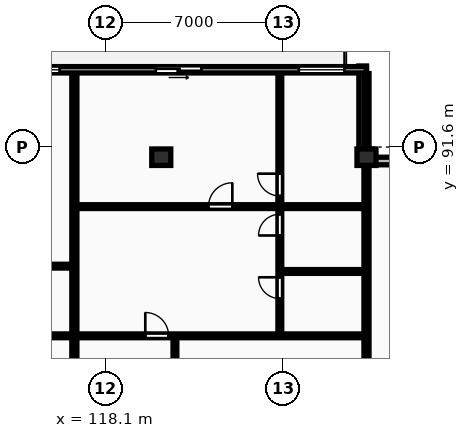
"""IFC4 building model, lengths in metres.
Left out: names, types, materials, properties, quantities, classifications, styles, units other than length and angle.
Written with IfcOpenShell. Run it as: python <this file> out.ifc"""

import sys

from ifc_helpers import new_model, si_unit, direction, frame, frame_2d, origin, origin_2d, place, context, subcontext, project, spatial, rectangle, extrude, element, fill, save


model = new_model("IFC4")
c1 = context("Model", 3, precision=1e-05, world=origin(), true_north=direction((0.0, 1.0)))
c2 = subcontext(c1, "Body", "Model", "MODEL_VIEW")
j1 = project(units=[si_unit("LENGTHUNIT", "METRE"), si_unit("PLANEANGLEUNIT", "RADIAN")], contexts=[c1])
p1 = place(None, origin())
s1 = spatial("IfcSite", under=j1, at=p1, CompositionType="ELEMENT")
p2 = place(p1, origin())
s2 = spatial("IfcBuilding", under=s1, at=p2, CompositionType="ELEMENT")
p3 = place(p2, frame((0.0, 0.0, 228.65)))
s3 = spatial("IfcBuildingStorey", under=s2, at=p3, CompositionType="ELEMENT", Elevation=228.65)
for number, where, z_axis, x_axis in (
    (1, (120.3, 91.2, 0.0), (0.0, 0.0, 1.0), (1.0, 0.0, 0.0)),
    (2, (128.4, 91.2, 0.0), (0.0, 0.0, 1.0), (1.0, 0.0, 0.0)),
):
    element("IfcColumn", number, at=place(p3, frame(where, z_axis=z_axis, x_axis=x_axis)), inside=s3, PredefinedType="COLUMN", context=c2, shape_type="SweptSolid", body=[
        extrude(rectangle(XDim=0.75, YDim=0.65, at=origin_2d()), origin(), (0.0, 0.0, 1.0), 3.45),
    ])
for number, where, z_axis, x_axis in (
    (3, (132.0, 91.05, 0.0), (0.0, 0.0, 1.0), (-1.0, 0.0, 0.0)),
    (4, (128.25, 91.2, 0.0), (0.0, 0.0, 1.0), (0.0, 1.0, 0.0)),
):
    element("IfcWall", number, at=place(p3, frame(where, z_axis=z_axis, x_axis=x_axis)), inside=s3, PredefinedType="STANDARD", context=c2, shape_type="SweptSolid", body=[
        extrude(rectangle(XDim=3.6, YDim=0.3, at=frame_2d((1.8, 0.0))), origin(), (0.0, 0.0, 1.0), 3.17),
    ])
p4 = place(p3, frame((128.4, 94.65, 0.0), z_axis=(0.0, 0.0, 1.0), x_axis=(-1.0, 0.0, 0.0)))
e5 = element("IfcWall", 5, at=p4, inside=s3, PredefinedType="STANDARD", context=c2, shape_type="SweptSolid", body=[
    extrude(rectangle(XDim=68.6, YDim=0.25, at=frame_2d((34.3, 0.0))), origin(), (0.0, 0.0, 1.0), 3.17),
])
p5 = place(p4, frame((59.262, 0.0, 0.85)))
e6 = element("IfcOpeningElement", 6, at=p5, cuts=e5, PredefinedType="OPENING", context=c2, shape_type="SweptSolid", body=[
    extrude(rectangle(XDim=2.4, YDim=1.9, at=frame_2d((1.2, 0.95))), frame((0.0, 0.135, 0.0), z_axis=(0.0, -1.0, 0.0), x_axis=(1.0, 0.0, 0.0)), (0.0, 0.0, 1.0), 0.27),
])
p6 = place(p4, frame((52.567, 0.0, 0.85)))
e7 = element("IfcOpeningElement", 7, at=p6, cuts=e5, PredefinedType="OPENING", context=c2, shape_type="SweptSolid", body=[
    extrude(rectangle(XDim=2.4, YDim=1.9, at=frame_2d((1.2, 0.95))), frame((0.0, 0.135, 0.0), z_axis=(0.0, -1.0, 0.0), x_axis=(1.0, 0.0, 0.0)), (0.0, 0.0, 1.0), 0.27),
])
p7 = place(p4, frame((65.245, 0.0, 0.0)))
e8 = element("IfcOpeningElement", 8, at=p7, cuts=e5, PredefinedType="OPENING", context=c2, shape_type="SweptSolid", body=[
    extrude(rectangle(XDim=1.8, YDim=2.2, at=frame_2d((0.9, 1.1))), frame((0.0, 0.135, 0.0), z_axis=(0.0, -1.0, 0.0), x_axis=(1.0, 0.0, 0.0)), (0.0, 0.0, 1.0), 0.27),
])
p8 = place(p4, frame((47.726, 0.0, 0.85)))
e9 = element("IfcOpeningElement", 9, at=p8, cuts=e5, PredefinedType="OPENING", context=c2, shape_type="SweptSolid", body=[
    extrude(rectangle(XDim=1.8, YDim=1.8, at=frame_2d((0.9, 0.9))), frame((0.0, 0.135, 0.0), z_axis=(0.0, -1.0, 0.0), x_axis=(1.0, 0.0, 0.0)), (0.0, 0.0, 1.0), 0.27),
])
p9 = place(p4, frame((41.938, 0.0, 0.0)))
e10 = element("IfcOpeningElement", 10, at=p9, cuts=e5, PredefinedType="OPENING", context=c2, shape_type="SweptSolid", body=[
    extrude(rectangle(XDim=1.8, YDim=2.2, at=frame_2d((0.9, 1.1))), frame((0.0, 0.135, 0.0), z_axis=(0.0, -1.0, 0.0), x_axis=(1.0, 0.0, 0.0)), (0.0, 0.0, 1.0), 0.27),
])
p10 = place(p4, frame((32.824, 0.0, 0.85)))
e11 = element("IfcOpeningElement", 11, at=p10, cuts=e5, PredefinedType="OPENING", context=c2, shape_type="SweptSolid", body=[
    extrude(rectangle(XDim=2.4, YDim=1.9, at=frame_2d((1.2, 0.95))), frame((0.0, 0.135, 0.0), z_axis=(0.0, -1.0, 0.0), x_axis=(1.0, 0.0, 0.0)), (0.0, 0.0, 1.0), 0.27),
])
p11 = place(p4, frame((20.245, 0.0, 0.85)))
e12 = element("IfcOpeningElement", 12, at=p11, cuts=e5, PredefinedType="OPENING", context=c2, shape_type="SweptSolid", body=[
    extrude(rectangle(XDim=2.4, YDim=1.9, at=frame_2d((1.2, 0.95))), frame((0.0, 0.135, 0.0), z_axis=(0.0, -1.0, 0.0), x_axis=(1.0, 0.0, 0.0)), (0.0, 0.0, 1.0), 0.27),
])
p12 = place(p4, frame((15.645, 0.0, 0.85)))
e13 = element("IfcOpeningElement", 13, at=p12, cuts=e5, PredefinedType="OPENING", context=c2, shape_type="SweptSolid", body=[
    extrude(rectangle(XDim=2.4, YDim=1.9, at=frame_2d((1.2, 0.95))), frame((0.0, 0.135, 0.0), z_axis=(0.0, -1.0, 0.0), x_axis=(1.0, 0.0, 0.0)), (0.0, 0.0, 1.0), 0.27),
])
p13 = place(p4, frame((25.272, 0.0, 0.0)))
e14 = element("IfcOpeningElement", 14, at=p13, cuts=e5, PredefinedType="OPENING", context=c2, shape_type="SweptSolid", body=[
    extrude(rectangle(XDim=1.8, YDim=2.2, at=frame_2d((0.9, 1.1))), frame((0.0, 0.135, 0.0), z_axis=(0.0, -1.0, 0.0), x_axis=(1.0, 0.0, 0.0)), (0.0, 0.0, 1.0), 0.27),
])
p14 = place(p4, frame((12.11, 0.0, 0.85)))
e15 = element("IfcOpeningElement", 15, at=p14, cuts=e5, PredefinedType="OPENING", context=c2, shape_type="SweptSolid", body=[
    extrude(rectangle(XDim=1.8, YDim=1.8, at=frame_2d((0.9, 0.9))), frame((0.0, 0.135, 0.0), z_axis=(0.0, -1.0, 0.0), x_axis=(1.0, 0.0, 0.0)), (0.0, 0.0, 1.0), 0.27),
])
p15 = place(p4, frame((6.515, 0.0, 0.0)))
e16 = element("IfcOpeningElement", 16, at=p15, cuts=e5, PredefinedType="OPENING", context=c2, shape_type="SweptSolid", body=[
    extrude(rectangle(XDim=1.8, YDim=2.2, at=frame_2d((0.9, 1.1))), frame((0.0, 0.135, 0.0), z_axis=(0.0, -1.0, 0.0), x_axis=(1.0, 0.0, 0.0)), (0.0, 0.0, 1.0), 0.27),
])
p16 = place(p4, frame((0.87, 0.0, 0.85)))
e17 = element("IfcOpeningElement", 17, at=p16, cuts=e5, PredefinedType="OPENING", context=c2, shape_type="SweptSolid", body=[
    extrude(rectangle(XDim=1.8, YDim=1.8, at=frame_2d((0.9, 0.9))), frame((0.0, 0.135, 0.0), z_axis=(0.0, -1.0, 0.0), x_axis=(1.0, 0.0, 0.0)), (0.0, 0.0, 1.0), 0.27),
])
p17 = place(p3, frame((128.4, 70.18, 0.0), z_axis=(0.0, 0.0, 1.0), x_axis=(0.0, 1.0, 0.0)))
e18 = element("IfcWall", 18, at=p17, inside=s3, PredefinedType="PARTITIONING", context=c2, shape_type="SweptSolid", body=[
    extrude(rectangle(XDim=24.32, YDim=0.2, at=frame_2d((12.16, 0.0))), origin(), (0.0, 0.0, 1.0), 2.477),
])
p18 = place(p3, frame((116.87, 70.18, 0.0), z_axis=(0.0, 0.0, 1.0), x_axis=(0.0, 1.0, 0.0)))
e19 = element("IfcWall", 19, at=p18, inside=s3, PredefinedType="PARTITIONING", context=c2, shape_type="SweptSolid", body=[
    extrude(rectangle(XDim=24.32, YDim=0.2, at=frame_2d((12.16, 0.0))), origin(), (0.0, 0.0, 1.0), 3.17),
])
p19 = place(p3, frame((104.82, 86.9, 0.0), z_axis=(0.0, 0.0, 1.0), x_axis=(1.0, 0.0, 0.0)))
e20 = element("IfcWall", 20, at=p19, inside=s3, PredefinedType="PARTITIONING", context=c2, shape_type="SweptSolid", body=[
    extrude(rectangle(XDim=11.969, YDim=0.15, at=frame_2d((5.985, 0.0))), origin(), (0.0, 0.0, 1.0), 3.17),
])
p20 = place(p19, frame((1.21, 0.0, 0.0)))
e21 = element("IfcOpeningElement", 21, at=p20, cuts=e20, PredefinedType="OPENING", context=c2, shape_type="SweptSolid", body=[
    extrude(rectangle(XDim=0.84, YDim=2.04, at=frame_2d((0.42, 1.02))), frame((0.0, 0.085, 0.0), z_axis=(0.0, -1.0, 0.0), x_axis=(1.0, 0.0, 0.0)), (0.0, 0.0, 1.0), 0.17),
])
p21 = place(p19, frame((5.565, 0.0, 0.0)))
e22 = element("IfcOpeningElement", 22, at=p21, cuts=e20, PredefinedType="OPENING", context=c2, shape_type="SweptSolid", body=[
    extrude(rectangle(XDim=0.84, YDim=2.04, at=frame_2d((0.42, 1.02))), frame((0.0, 0.085, 0.0), z_axis=(0.0, -1.0, 0.0), x_axis=(1.0, 0.0, 0.0)), (0.0, 0.0, 1.0), 0.17),
])
p22 = place(p19, frame((9.41, 0.0, 0.0)))
e23 = element("IfcOpeningElement", 23, at=p22, cuts=e20, PredefinedType="OPENING", context=c2, shape_type="SweptSolid", body=[
    extrude(rectangle(XDim=0.84, YDim=2.04, at=frame_2d((0.42, 1.02))), frame((0.0, 0.085, 0.0), z_axis=(0.0, -1.0, 0.0), x_axis=(1.0, 0.0, 0.0)), (0.0, 0.0, 1.0), 0.17),
])
p23 = place(p3, frame((99.635, 84.15, 0.0), z_axis=(0.0, 0.0, 1.0), x_axis=(1.0, 0.0, 0.0)))
e24 = element("IfcWall", 24, at=p23, inside=s3, PredefinedType="PARTITIONING", context=c2, shape_type="SweptSolid", body=[
    extrude(rectangle(XDim=17.154, YDim=0.15, at=frame_2d((8.577, 0.0))), origin(), (0.0, 0.0, 1.0), 3.17),
])
p24 = place(p23, frame((2.72, 0.0, 0.0)))
e25 = element("IfcOpeningElement", 25, at=p24, cuts=e24, PredefinedType="OPENING", context=c2, shape_type="SweptSolid", body=[
    extrude(rectangle(XDim=0.92, YDim=2.08, at=frame_2d((0.46, 1.04))), frame((0.0, 0.085, 0.0), z_axis=(0.0, -1.0, 0.0), x_axis=(1.0, 0.0, 0.0)), (0.0, 0.0, 1.0), 0.17),
])
p25 = place(p3, frame((120.84, 70.16, 0.0), z_axis=(0.0, 0.0, 1.0), x_axis=(0.0, 1.0, 0.0)))
e26 = element("IfcWall", 26, at=p25, inside=s3, PredefinedType="PARTITIONING", context=c2, shape_type="SweptSolid", body=[
    extrude(rectangle(XDim=13.95, YDim=0.15, at=frame_2d((6.975, 0.0))), origin(), (0.0, 0.0, 1.0), 3.17),
])
p26 = place(p25, frame((5.845, 0.0, 0.0)))
e27 = element("IfcOpeningElement", 27, at=p26, cuts=e26, PredefinedType="OPENING", context=c2, shape_type="SweptSolid", body=[
    extrude(rectangle(XDim=0.88, YDim=2.06, at=frame_2d((0.44, 1.03))), frame((0.0, 0.085, 0.0), z_axis=(0.0, -1.0, 0.0), x_axis=(1.0, 0.0, 0.0)), (0.0, 0.0, 1.0), 0.17),
])
p27 = place(p3, frame((125.04, 86.69, 0.0), z_axis=(0.0, 0.0, 1.0), x_axis=(1.0, 0.0, 0.0)))
e28 = element("IfcWall", 28, at=p27, inside=s3, PredefinedType="PARTITIONING", context=c2, shape_type="SweptSolid", body=[
    extrude(rectangle(XDim=3.28, YDim=0.15, at=frame_2d((1.64, 0.0))), origin(), (0.0, 0.0, 1.0), 3.17),
])
p28 = place(p3, frame((124.98, 84.19, 0.0), z_axis=(0.0, 0.0, 1.0), x_axis=(0.0, 1.0, 0.0)))
e29 = element("IfcWall", 29, at=p28, inside=s3, PredefinedType="PARTITIONING", context=c2, shape_type="SweptSolid", body=[
    extrude(rectangle(XDim=10.31, YDim=0.15, at=frame_2d((5.155, 0.0))), origin(), (0.0, 0.0, 1.0), 3.17),
])
p29 = place(p28, frame((1.43, 0.0, 0.0)))
e30 = element("IfcOpeningElement", 30, at=p29, cuts=e29, PredefinedType="OPENING", context=c2, shape_type="SweptSolid", body=[
    extrude(rectangle(XDim=0.84, YDim=2.04, at=frame_2d((0.42, 1.02))), frame((0.0, 0.085, 0.0), z_axis=(0.0, -1.0, 0.0), x_axis=(1.0, 0.0, 0.0)), (0.0, 0.0, 1.0), 0.17),
])
p30 = place(p28, frame((3.92, 0.0, 0.0)))
e31 = element("IfcOpeningElement", 31, at=p30, cuts=e29, PredefinedType="OPENING", context=c2, shape_type="SweptSolid", body=[
    extrude(rectangle(XDim=0.84, YDim=2.04, at=frame_2d((0.42, 1.02))), frame((0.0, 0.085, 0.0), z_axis=(0.0, -1.0, 0.0), x_axis=(1.0, 0.0, 0.0)), (0.0, 0.0, 1.0), 0.17),
])
p31 = place(p28, frame((5.48, 0.0, 0.0)))
e32 = element("IfcOpeningElement", 32, at=p31, cuts=e29, PredefinedType="OPENING", context=c2, shape_type="SweptSolid", body=[
    extrude(rectangle(XDim=0.88, YDim=2.06, at=frame_2d((0.44, 1.03))), frame((0.0, 0.085, 0.0), z_axis=(0.0, -1.0, 0.0), x_axis=(1.0, 0.0, 0.0)), (0.0, 0.0, 1.0), 0.17),
])
p32 = place(p3, frame((116.95, 84.15, 0.0), z_axis=(0.0, 0.0, 1.0), x_axis=(1.0, 0.0, 0.0)))
e33 = element("IfcWall", 33, at=p32, inside=s3, PredefinedType="PARTITIONING", context=c2, shape_type="SweptSolid", body=[
    extrude(rectangle(XDim=11.37, YDim=0.15, at=frame_2d((5.685, 0.0))), origin(), (0.0, 0.0, 1.0), 3.17),
])
p33 = place(p32, frame((2.72, 0.0, 0.0)))
e34 = element("IfcOpeningElement", 34, at=p33, cuts=e33, PredefinedType="OPENING", context=c2, shape_type="SweptSolid", body=[
    extrude(rectangle(XDim=0.92, YDim=2.08, at=frame_2d((0.46, 1.04))), frame((0.0, 0.085, 0.0), z_axis=(0.0, -1.0, 0.0), x_axis=(1.0, 0.0, 0.0)), (0.0, 0.0, 1.0), 0.17),
])
p34 = place(p3, frame((116.95, 89.25, 0.0), z_axis=(0.0, 0.0, 1.0), x_axis=(1.0, 0.0, 0.0)))
e35 = element("IfcWall", 35, at=p34, inside=s3, PredefinedType="PARTITIONING", context=c2, shape_type="SweptSolid", body=[
    extrude(rectangle(XDim=11.37, YDim=0.15, at=frame_2d((5.685, 0.0))), origin(), (0.0, 0.0, 1.0), 3.17),
])
p35 = place(p34, frame((5.215, 0.0, 0.0)))
e36 = element("IfcOpeningElement", 36, at=p35, cuts=e35, PredefinedType="OPENING", context=c2, shape_type="SweptSolid", body=[
    extrude(rectangle(XDim=0.94, YDim=2.1, at=frame_2d((0.47, 1.05))), frame((0.0, 0.085, 0.0), z_axis=(0.0, -1.0, 0.0), x_axis=(1.0, 0.0, 0.0)), (0.0, 0.0, 1.0), 0.17),
])
p36 = place(p14, origin())
e37 = element("IfcWindow", 37, at=p36, inside=s3, PartitioningType="SINGLE_PANEL", PredefinedType="WINDOW", context=c2, shape_type="SweptSolid", body=[
    extrude(rectangle(XDim=1.8, YDim=1.8, at=frame_2d((0.9, 0.9))), frame((0.0, 0.03, 0.0), z_axis=(0.0, -1.0, 0.0), x_axis=(1.0, 0.0, 0.0)), (0.0, 0.0, 1.0), 0.06),
])
fill(e15, e37)
p37 = place(p15, origin())
e38 = element("IfcDoor", 38, at=p37, inside=s3, OperationType="SLIDING_TO_LEFT", PredefinedType="DOOR", context=c2, shape_type="SweptSolid", body=[
    extrude(rectangle(XDim=1.8, YDim=2.2, at=frame_2d((0.9, 1.1))), frame((0.0, 0.025, 0.0), z_axis=(0.0, -1.0, 0.0), x_axis=(1.0, 0.0, 0.0)), (0.0, 0.0, 1.0), 0.05),
])
fill(e16, e38)
p38 = place(p16, origin())
e39 = element("IfcWindow", 39, at=p38, inside=s3, PartitioningType="SINGLE_PANEL", PredefinedType="WINDOW", context=c2, shape_type="SweptSolid", body=[
    extrude(rectangle(XDim=1.8, YDim=1.8, at=frame_2d((0.9, 0.9))), frame((0.0, 0.03, 0.0), z_axis=(0.0, -1.0, 0.0), x_axis=(1.0, 0.0, 0.0)), (0.0, 0.0, 1.0), 0.06),
])
fill(e17, e39)
p39 = place(p29, origin())
e40 = element("IfcDoor", 40, at=p39, inside=s3, OperationType="SINGLE_SWING_RIGHT", PredefinedType="DOOR", context=c2, shape_type="SweptSolid", body=[
    extrude(rectangle(XDim=0.84, YDim=2.04, at=frame_2d((0.42, 1.02))), frame((0.0, 0.025, 0.0), z_axis=(0.0, -1.0, 0.0), x_axis=(1.0, 0.0, 0.0)), (0.0, 0.0, 1.0), 0.05),
])
fill(e30, e40)
p40 = place(p30, origin())
e41 = element("IfcDoor", 41, at=p40, inside=s3, OperationType="SINGLE_SWING_LEFT", PredefinedType="DOOR", context=c2, shape_type="SweptSolid", body=[
    extrude(rectangle(XDim=0.84, YDim=2.04, at=frame_2d((0.42, 1.02))), frame((0.0, 0.025, 0.0), z_axis=(0.0, -1.0, 0.0), x_axis=(1.0, 0.0, 0.0)), (0.0, 0.0, 1.0), 0.05),
])
fill(e31, e41)
p41 = place(p31, origin())
e42 = element("IfcDoor", 42, at=p41, inside=s3, OperationType="SINGLE_SWING_RIGHT", PredefinedType="DOOR", context=c2, shape_type="SweptSolid", body=[
    extrude(rectangle(XDim=0.88, YDim=2.06, at=frame_2d((0.44, 1.03))), frame((0.0, 0.025, 0.0), z_axis=(0.0, -1.0, 0.0), x_axis=(1.0, 0.0, 0.0)), (0.0, 0.0, 1.0), 0.05),
])
fill(e32, e42)
p42 = place(p33, origin())
e43 = element("IfcDoor", 43, at=p42, inside=s3, OperationType="SINGLE_SWING_LEFT", PredefinedType="DOOR", context=c2, shape_type="SweptSolid", body=[
    extrude(rectangle(XDim=0.92, YDim=2.08, at=frame_2d((0.46, 1.04))), frame((0.0, 0.025, 0.0), z_axis=(0.0, -1.0, 0.0), x_axis=(1.0, 0.0, 0.0)), (0.0, 0.0, 1.0), 0.05),
])
fill(e34, e43)
p43 = place(p35, origin())
e44 = element("IfcDoor", 44, at=p43, inside=s3, OperationType="SINGLE_SWING_RIGHT", PredefinedType="DOOR", context=c2, shape_type="SweptSolid", body=[
    extrude(rectangle(XDim=0.94, YDim=2.1, at=frame_2d((0.47, 1.05))), frame((0.0, 0.025, 0.0), z_axis=(0.0, -1.0, 0.0), x_axis=(1.0, 0.0, 0.0)), (0.0, 0.0, 1.0), 0.05),
])
fill(e36, e44)
save(model, sys.argv[1])
